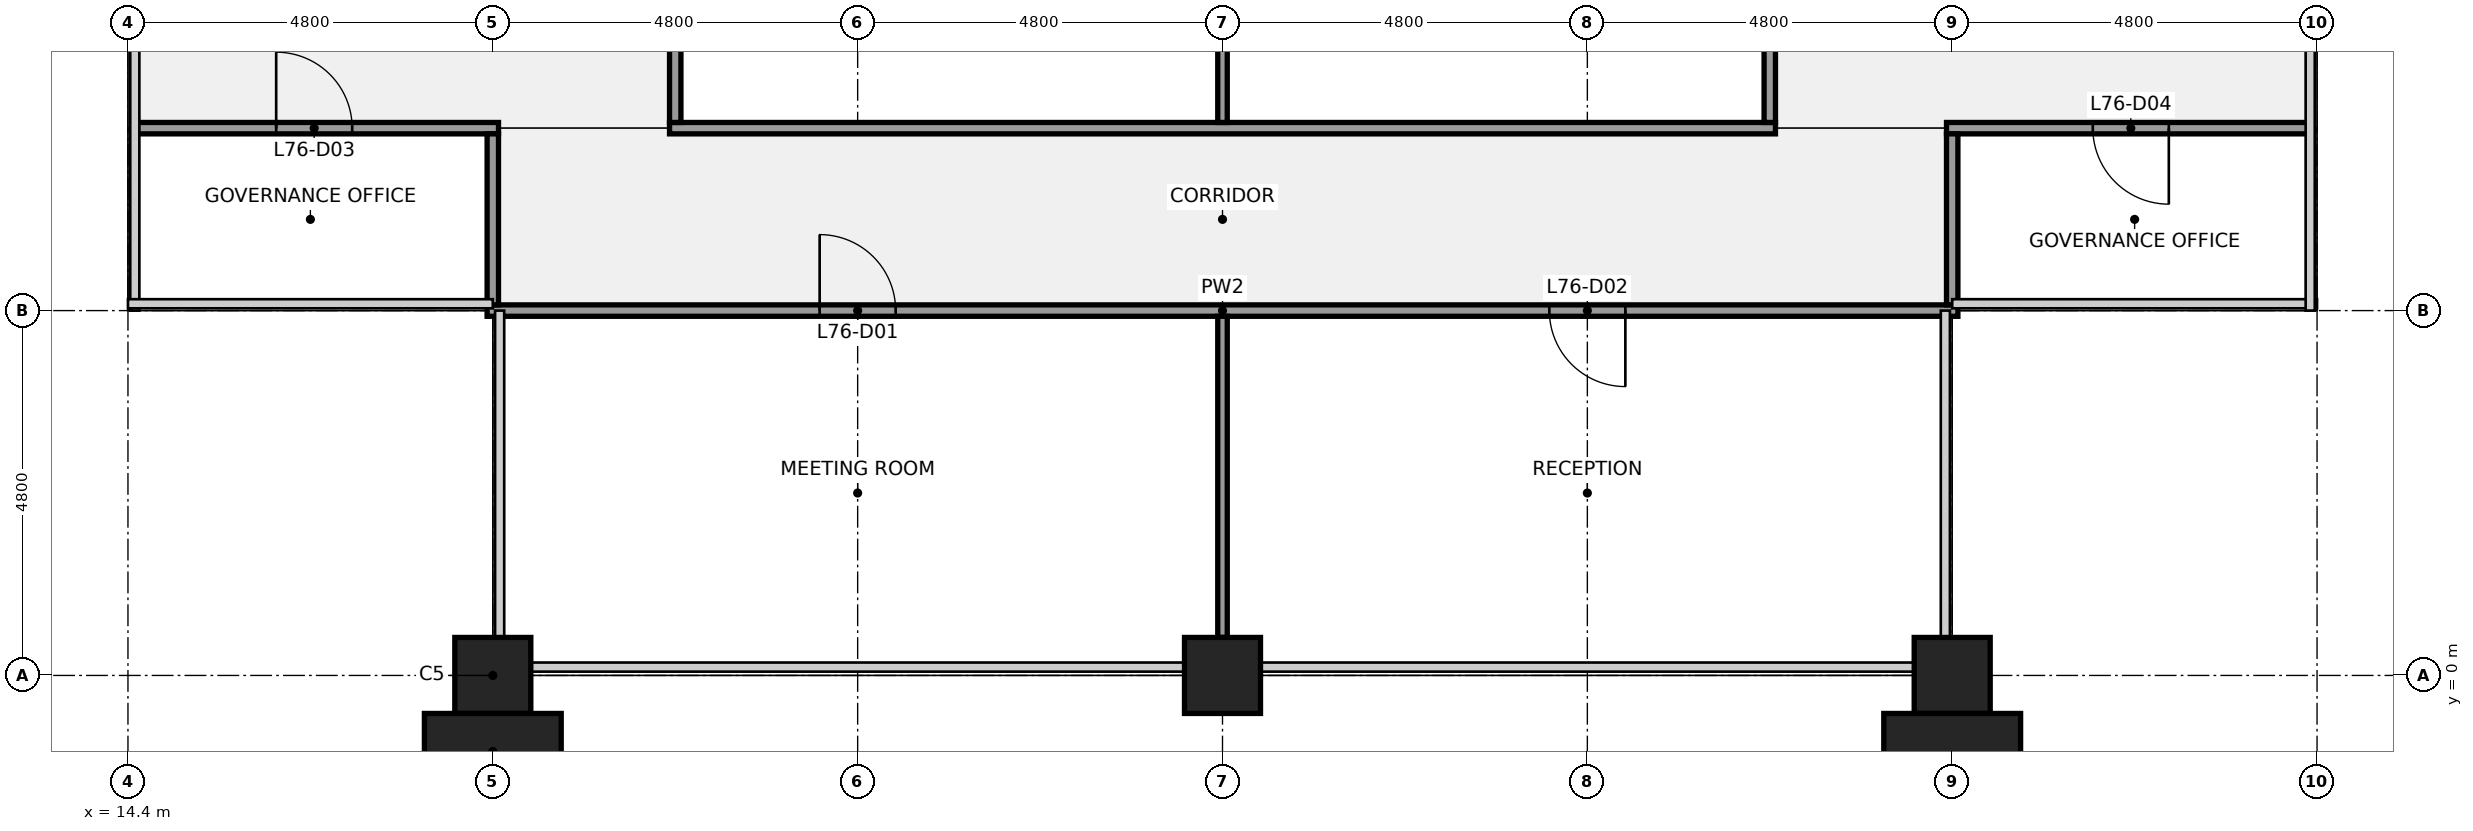
"""IFC4 building model, lengths in metres.
Left out: names, types, materials, properties, quantities, classifications, styles, units other than length and angle.
Written with IfcOpenShell. Run it as: python <this file> out.ifc"""

import sys

from ifc_helpers import new_model, si_unit, direction, frame, frame_2d, origin, origin_2d, place, context, subcontext, project, spatial, rectangle, extrude, element, fill, save


model = new_model("IFC4")
c1 = context("Model", 3, precision=1e-05, world=origin(), true_north=direction((0.0, 1.0)))
c2 = subcontext(c1, "Body", "Model", "MODEL_VIEW")
j1 = project(units=[si_unit("LENGTHUNIT", "METRE"), si_unit("PLANEANGLEUNIT", "RADIAN")], contexts=[c1])
p1 = place(None, origin())
s1 = spatial("IfcSite", under=j1, at=p1, CompositionType="ELEMENT")
p2 = place(p1, origin())
s2 = spatial("IfcBuilding", under=s1, at=p2, CompositionType="ELEMENT")
p3 = place(p2, frame((0.0, 0.0, 342.3)))
s3 = spatial("IfcBuildingStorey", under=s2, at=p3, CompositionType="ELEMENT", Elevation=342.3)
for number, where, z_axis, x_axis in (
    (1, (19.2, 0.0, 0.0), (0.0, 0.0, 1.0), (1.0, 0.0, 0.0)),
    (2, (28.8, 0.0, 0.0), (0.0, 0.0, 1.0), (1.0, 0.0, 0.0)),
    (3, (38.4, 0.0, 0.0), (0.0, 0.0, 1.0), (1.0, 0.0, 0.0)),
):
    element("IfcColumn", number, at=place(p3, frame(where, z_axis=z_axis, x_axis=x_axis)), inside=s3, PredefinedType="COLUMN", context=c2, shape_type="SweptSolid", body=[
        extrude(rectangle(XDim=1.0, YDim=1.0, at=origin_2d()), origin(), (0.0, 0.0, 1.0), 4.0),
    ])
p4 = place(p3, frame((19.125, 4.8, 0.0), z_axis=(0.0, 0.0, 1.0), x_axis=(1.0, 0.0, 0.0)))
e4 = element("IfcWall", 4, at=p4, inside=s3, PredefinedType="PARTITIONING", context=c2, shape_type="SweptSolid", body=[
    extrude(rectangle(XDim=19.35, YDim=0.15, at=frame_2d((9.675, 0.0))), origin(), (0.0, 0.0, 1.0), 2.87),
])
p5 = place(p4, frame((4.375, 0.0, 0.0)))
e5 = element("IfcOpeningElement", 5, at=p5, cuts=e4, PredefinedType="OPENING", context=c2, shape_type="SweptSolid", body=[
    extrude(rectangle(XDim=1.0, YDim=2.1, at=frame_2d((0.5, 1.05))), frame((0.0, 0.085, 0.0), z_axis=(0.0, -1.0, 0.0), x_axis=(1.0, 0.0, 0.0)), (0.0, 0.0, 1.0), 0.17),
])
p6 = place(p4, frame((13.975, 0.0, 0.0)))
e6 = element("IfcOpeningElement", 6, at=p6, cuts=e4, PredefinedType="OPENING", context=c2, shape_type="SweptSolid", body=[
    extrude(rectangle(XDim=1.0, YDim=2.1, at=frame_2d((0.5, 1.05))), frame((0.0, 0.085, 0.0), z_axis=(0.0, -1.0, 0.0), x_axis=(1.0, 0.0, 0.0)), (0.0, 0.0, 1.0), 0.17),
])
p7 = place(p3, frame((14.5, 7.2, 0.0), z_axis=(0.0, 0.0, 1.0), x_axis=(1.0, 0.0, 0.0)))
e7 = element("IfcWall", 7, at=p7, inside=s3, PredefinedType="PARTITIONING", context=c2, shape_type="SweptSolid", body=[
    extrude(rectangle(XDim=4.775, YDim=0.15, at=frame_2d((2.387, 0.0))), origin(), (0.0, 0.0, 1.0), 2.87),
])
p8 = place(p7, frame((1.85, 0.0, 0.0)))
e8 = element("IfcOpeningElement", 8, at=p8, cuts=e7, PredefinedType="OPENING", context=c2, shape_type="SweptSolid", body=[
    extrude(rectangle(XDim=1.0, YDim=2.1, at=frame_2d((0.5, 1.05))), frame((0.0, 0.085, 0.0), z_axis=(0.0, -1.0, 0.0), x_axis=(1.0, 0.0, 0.0)), (0.0, 0.0, 1.0), 0.17),
])
p9 = place(p3, frame((21.525, 7.2, 0.0), z_axis=(0.0, 0.0, 1.0), x_axis=(1.0, 0.0, 0.0)))
e9 = element("IfcWall", 9, at=p9, inside=s3, PredefinedType="PARTITIONING", context=c2, shape_type="SweptSolid", body=[
    extrude(rectangle(XDim=14.55, YDim=0.15, at=frame_2d((7.275, 0.0))), origin(), (0.0, 0.0, 1.0), 2.87),
])
p10 = place(p3, frame((38.325, 7.2, 0.0), z_axis=(0.0, 0.0, 1.0), x_axis=(1.0, 0.0, 0.0)))
e10 = element("IfcWall", 10, at=p10, inside=s3, PredefinedType="PARTITIONING", context=c2, shape_type="SweptSolid", body=[
    extrude(rectangle(XDim=4.775, YDim=0.15, at=frame_2d((2.388, 0.0))), origin(), (0.0, 0.0, 1.0), 2.87),
])
p11 = place(p10, frame((1.925, 0.0, 0.0)))
e11 = element("IfcOpeningElement", 11, at=p11, cuts=e10, PredefinedType="OPENING", context=c2, shape_type="SweptSolid", body=[
    extrude(rectangle(XDim=1.0, YDim=2.1, at=frame_2d((0.5, 1.05))), frame((0.0, 0.085, 0.0), z_axis=(0.0, -1.0, 0.0), x_axis=(1.0, 0.0, 0.0)), (0.0, 0.0, 1.0), 0.17),
])
p12 = place(p3, frame((19.2, 4.875, 0.0), z_axis=(0.0, 0.0, 1.0), x_axis=(0.0, 1.0, 0.0)))
e12 = element("IfcWall", 12, at=p12, inside=s3, PredefinedType="PARTITIONING", context=c2, shape_type="SweptSolid", body=[
    extrude(rectangle(XDim=2.25, YDim=0.15, at=frame_2d((1.125, 0.0))), origin(), (0.0, 0.0, 1.0), 2.87),
])
p13 = place(p3, frame((21.6, 7.275, 0.0), z_axis=(0.0, 0.0, 1.0), x_axis=(0.0, 1.0, 0.0)))
e13 = element("IfcWall", 13, at=p13, inside=s3, PredefinedType="PARTITIONING", context=c2, shape_type="SweptSolid", body=[
    extrude(rectangle(XDim=7.062, YDim=0.15, at=frame_2d((3.531, 0.0))), origin(), (0.0, 0.0, 1.0), 2.87),
])
p14 = place(p13, frame((3.031, 0.0, 0.0)))
e14 = element("IfcOpeningElement", 14, at=p14, cuts=e13, PredefinedType="OPENING", context=c2, shape_type="SweptSolid", body=[
    extrude(rectangle(XDim=1.0, YDim=2.1, at=frame_2d((0.5, 1.05))), frame((0.0, 0.085, 0.0), z_axis=(0.0, -1.0, 0.0), x_axis=(1.0, 0.0, 0.0)), (0.0, 0.0, 1.0), 0.17),
])
p15 = place(p3, frame((28.8, 0.5, 0.0), z_axis=(0.0, 0.0, 1.0), x_axis=(0.0, 1.0, 0.0)))
e15 = element("IfcWall", 15, at=p15, inside=s3, PredefinedType="PARTITIONING", context=c2, shape_type="SweptSolid", body=[
    extrude(rectangle(XDim=4.225, YDim=0.125, at=frame_2d((2.113, 0.0))), origin(), (0.0, 0.0, 1.0), 2.87),
])
p16 = place(p3, frame((28.8, 7.275, 0.0), z_axis=(0.0, 0.0, 1.0), x_axis=(0.0, 1.0, 0.0)))
e16 = element("IfcWall", 16, at=p16, inside=s3, PredefinedType="PARTITIONING", context=c2, shape_type="SweptSolid", body=[
    extrude(rectangle(XDim=7.062, YDim=0.125, at=frame_2d((3.531, 0.0))), origin(), (0.0, 0.0, 1.0), 2.87),
])
p17 = place(p3, frame((36.0, 7.275, 0.0), z_axis=(0.0, 0.0, 1.0), x_axis=(0.0, 1.0, 0.0)))
e17 = element("IfcWall", 17, at=p17, inside=s3, PredefinedType="PARTITIONING", context=c2, shape_type="SweptSolid", body=[
    extrude(rectangle(XDim=7.062, YDim=0.15, at=frame_2d((3.531, 0.0))), origin(), (0.0, 0.0, 1.0), 2.87),
])
p18 = place(p17, frame((3.031, 0.0, 0.0)))
e18 = element("IfcOpeningElement", 18, at=p18, cuts=e17, PredefinedType="OPENING", context=c2, shape_type="SweptSolid", body=[
    extrude(rectangle(XDim=1.0, YDim=2.1, at=frame_2d((0.5, 1.05))), frame((0.0, 0.085, 0.0), z_axis=(0.0, -1.0, 0.0), x_axis=(1.0, 0.0, 0.0)), (0.0, 0.0, 1.0), 0.17),
])
p19 = place(p3, frame((38.4, 4.875, 0.0), z_axis=(0.0, 0.0, 1.0), x_axis=(0.0, 1.0, 0.0)))
e19 = element("IfcWall", 19, at=p19, inside=s3, PredefinedType="PARTITIONING", context=c2, shape_type="SweptSolid", body=[
    extrude(rectangle(XDim=2.25, YDim=0.15, at=frame_2d((1.125, 0.0))), origin(), (0.0, 0.0, 1.0), 2.87),
])
for number, where, z_axis, x_axis in (
    (20, (19.2, -1.0, 0.0), (0.0, 0.0, 1.0), (1.0, 0.0, 0.0)),
    (21, (38.4, -1.0, 0.0), (0.0, 0.0, 1.0), (1.0, 0.0, 0.0)),
):
    element("IfcColumn", number, at=place(p3, frame(where, z_axis=z_axis, x_axis=x_axis)), inside=s3, PredefinedType="PILASTER", context=c2, shape_type="SweptSolid", body=[
        extrude(rectangle(XDim=1.8, YDim=1.0, at=origin_2d()), origin(), (0.0, 0.0, 1.0), 4.0),
    ])
p20 = place(p5, origin())
e22 = element("IfcDoor", 22, at=p20, inside=s3, OperationType="SINGLE_SWING_LEFT", PredefinedType="DOOR", context=c2, shape_type="SweptSolid", body=[
    extrude(rectangle(XDim=1.0, YDim=2.1, at=frame_2d((0.5, 1.05))), frame((0.0, 0.025, 0.0), z_axis=(0.0, -1.0, 0.0), x_axis=(1.0, 0.0, 0.0)), (0.0, 0.0, 1.0), 0.05),
])
fill(e5, e22)
p21 = place(p6, origin())
e23 = element("IfcDoor", 23, at=p21, inside=s3, OperationType="SINGLE_SWING_RIGHT", PredefinedType="DOOR", context=c2, shape_type="SweptSolid", body=[
    extrude(rectangle(XDim=1.0, YDim=2.1, at=frame_2d((0.5, 1.05))), frame((0.0, 0.025, 0.0), z_axis=(0.0, -1.0, 0.0), x_axis=(1.0, 0.0, 0.0)), (0.0, 0.0, 1.0), 0.05),
])
fill(e6, e23)
p22 = place(p8, origin())
e24 = element("IfcDoor", 24, at=p22, inside=s3, OperationType="SINGLE_SWING_LEFT", PredefinedType="DOOR", context=c2, shape_type="SweptSolid", body=[
    extrude(rectangle(XDim=1.0, YDim=2.1, at=frame_2d((0.5, 1.05))), frame((0.0, 0.025, 0.0), z_axis=(0.0, -1.0, 0.0), x_axis=(1.0, 0.0, 0.0)), (0.0, 0.0, 1.0), 0.05),
])
fill(e8, e24)
p23 = place(p11, origin())
e25 = element("IfcDoor", 25, at=p23, inside=s3, OperationType="SINGLE_SWING_RIGHT", PredefinedType="DOOR", context=c2, shape_type="SweptSolid", body=[
    extrude(rectangle(XDim=1.0, YDim=2.1, at=frame_2d((0.5, 1.05))), frame((0.0, 0.025, 0.0), z_axis=(0.0, -1.0, 0.0), x_axis=(1.0, 0.0, 0.0)), (0.0, 0.0, 1.0), 0.05),
])
fill(e11, e25)
save(model, sys.argv[1])
